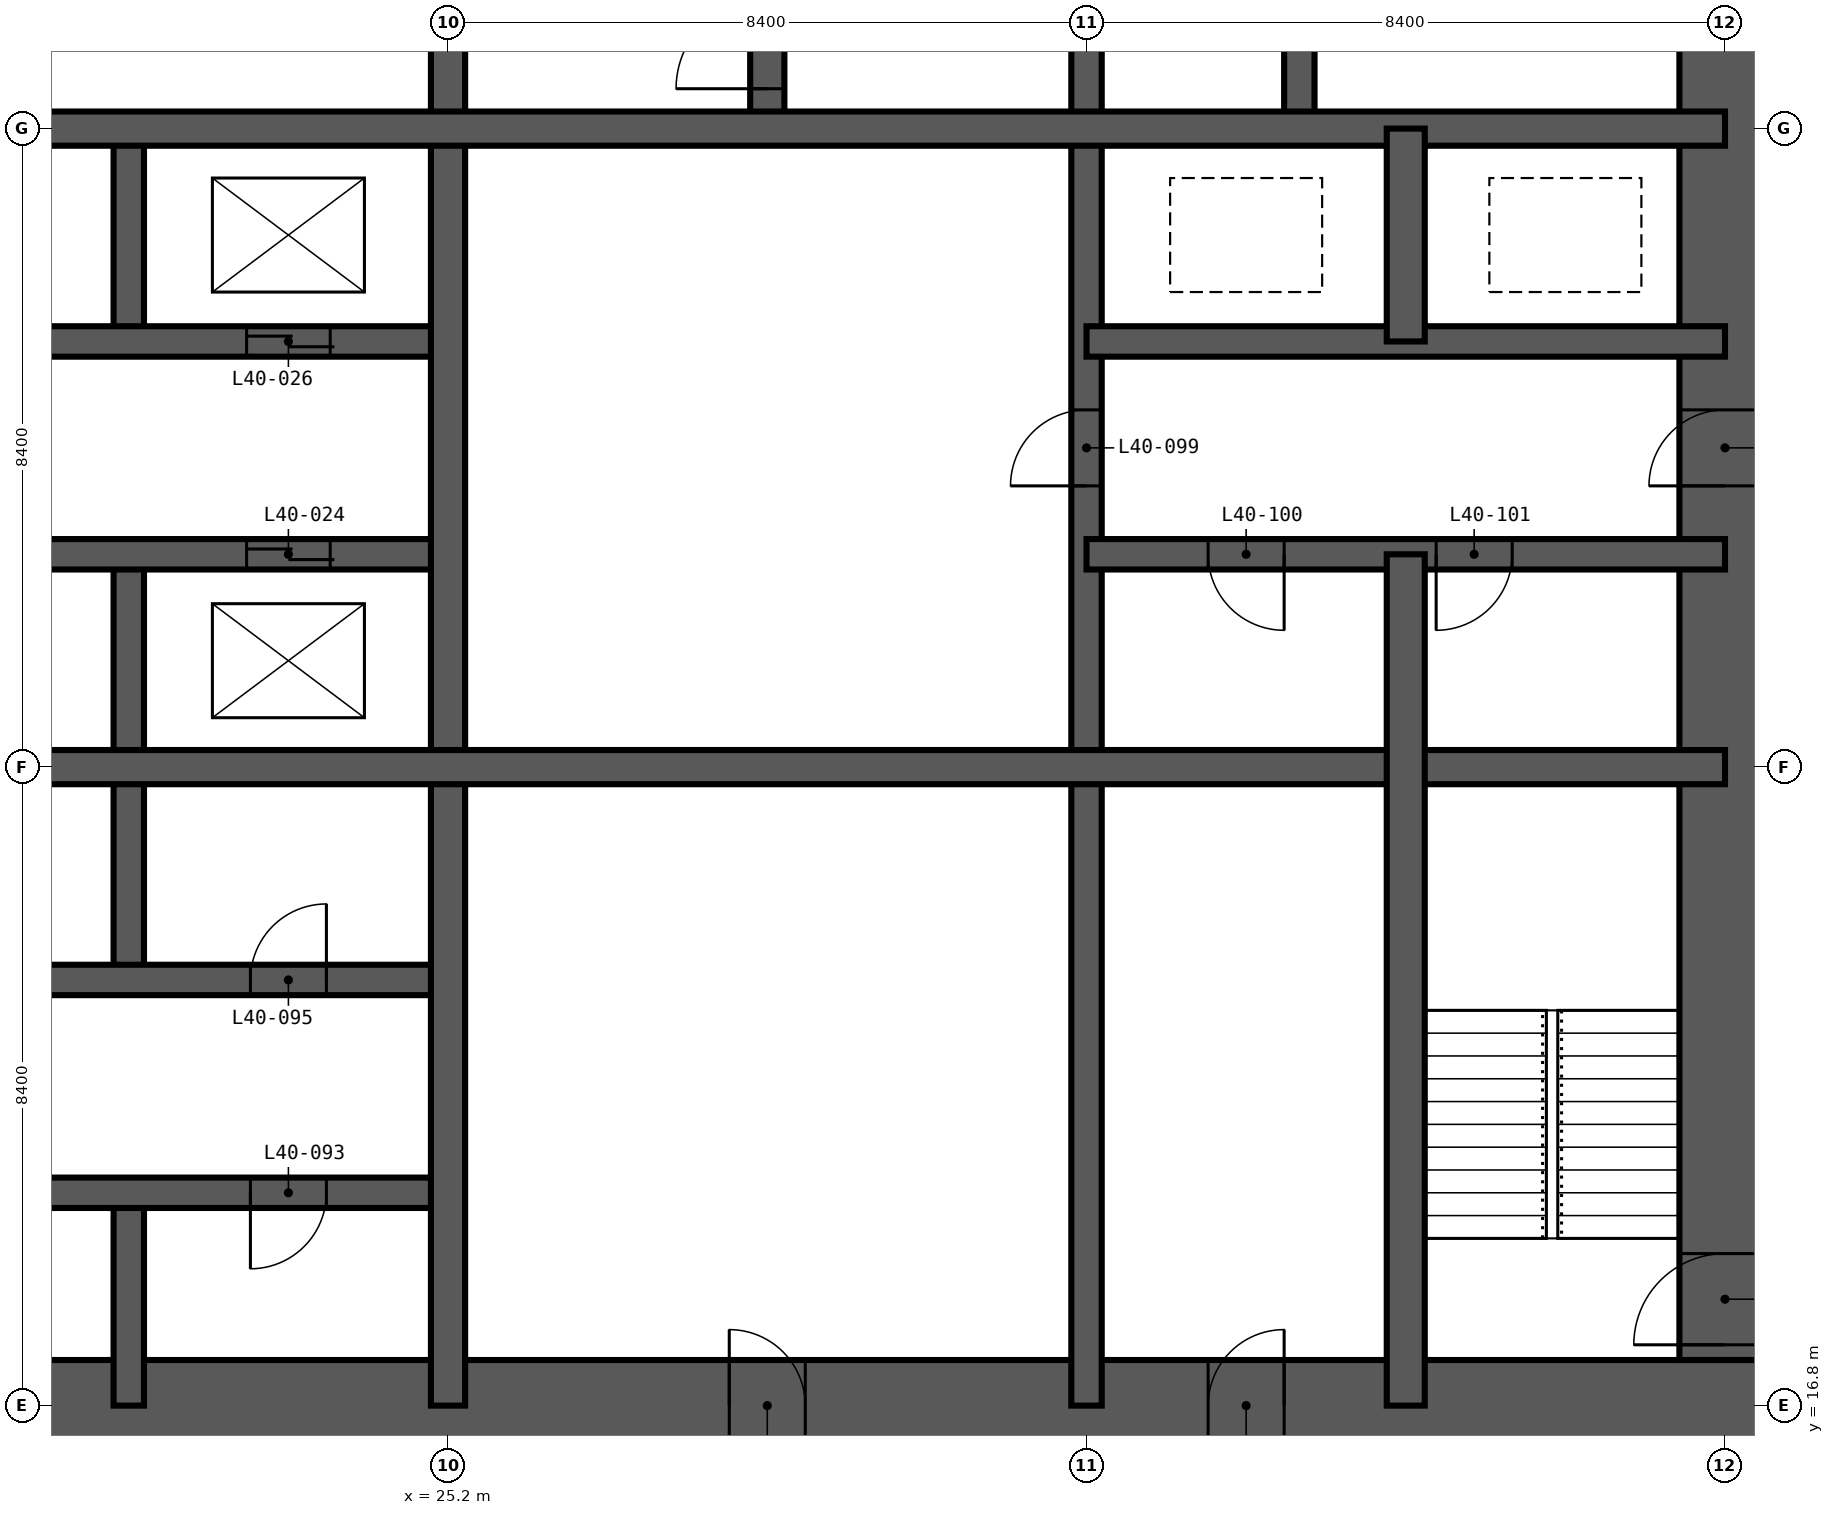
"""IFC4 building model, lengths in metres.
Left out: names, types, materials, properties, quantities, classifications, styles, units other than length and angle.
Written with IfcOpenShell. Run it as: python <this file> out.ifc"""

import sys

from ifc_helpers import new_model, si_unit, direction, frame, frame_2d, origin, place, context, subcontext, project, spatial, rectangle, extrude, element, fill, save


model = new_model("IFC4")
c1 = context("Model", 3, precision=1e-05, world=origin(), true_north=direction((0.0, 1.0)))
c2 = subcontext(c1, "Body", "Model", "MODEL_VIEW")
j1 = project(units=[si_unit("LENGTHUNIT", "METRE"), si_unit("PLANEANGLEUNIT", "RADIAN")], contexts=[c1])
p1 = place(None, origin())
s1 = spatial("IfcSite", under=j1, at=p1, CompositionType="ELEMENT")
p2 = place(p1, origin())
s2 = spatial("IfcBuilding", under=s1, at=p2, CompositionType="ELEMENT")
p3 = place(p2, frame((0.0, 0.0, 159.0)))
s3 = spatial("IfcBuildingStorey", under=s2, at=p3, CompositionType="ELEMENT", Elevation=159.0)
p4 = place(p3, frame((16.2, 16.8, -0.35), z_axis=(0.0, 0.0, 1.0), x_axis=(1.0, 0.0, 0.0)))
e1 = element("IfcWall", 1, at=p4, inside=s3, PredefinedType="SHEAR", context=c2, shape_type="SweptSolid", body=[
    extrude(rectangle(XDim=26.4, YDim=1.2, at=frame_2d((13.2, 0.0))), origin(), (0.0, 0.0, 1.0), 3.6),
])
p5 = place(p4, frame((12.7, 0.0, 0.35)))
e2 = element("IfcOpeningElement", 2, at=p5, cuts=e1, PredefinedType="OPENING", context=c2, shape_type="SweptSolid", body=[
    extrude(rectangle(XDim=1.0, YDim=2.1, at=frame_2d((0.5, 1.05))), frame((0.0, 0.61, 0.0), z_axis=(0.0, -1.0, 0.0), x_axis=(1.0, 0.0, 0.0)), (0.0, 0.0, 1.0), 1.22),
])
p6 = place(p4, frame((19.0, 0.0, 0.35)))
e3 = element("IfcOpeningElement", 3, at=p6, cuts=e1, PredefinedType="OPENING", context=c2, shape_type="SweptSolid", body=[
    extrude(rectangle(XDim=1.0, YDim=2.1, at=frame_2d((0.5, 1.05))), frame((0.0, 0.61, 0.0), z_axis=(0.0, -1.0, 0.0), x_axis=(1.0, 0.0, 0.0)), (0.0, 0.0, 1.0), 1.22),
])
p7 = place(p3, frame((42.0, 17.4, -0.35), z_axis=(0.0, 0.0, 1.0), x_axis=(0.0, 1.0, 0.0)))
e4 = element("IfcWall", 4, at=p7, inside=s3, PredefinedType="SHEAR", context=c2, shape_type="SweptSolid", body=[
    extrude(rectangle(XDim=24.0, YDim=1.2, at=frame_2d((12.0, 0.0))), origin(), (0.0, 0.0, 1.0), 3.6),
])
p8 = place(p7, frame((0.2, 0.0, 0.35)))
e5 = element("IfcOpeningElement", 5, at=p8, cuts=e4, PredefinedType="OPENING", context=c2, shape_type="SweptSolid", body=[
    extrude(rectangle(XDim=1.2, YDim=2.2, at=frame_2d((0.6, 1.1))), frame((0.0, 0.61, 0.0), z_axis=(0.0, -1.0, 0.0), x_axis=(1.0, 0.0, 0.0)), (0.0, 0.0, 1.0), 1.22),
])
p9 = place(p7, frame((11.5, 0.0, 0.35)))
e6 = element("IfcOpeningElement", 6, at=p9, cuts=e4, PredefinedType="OPENING", context=c2, shape_type="SweptSolid", body=[
    extrude(rectangle(XDim=1.0, YDim=2.1, at=frame_2d((0.5, 1.05))), frame((0.0, 0.61, 0.0), z_axis=(0.0, -1.0, 0.0), x_axis=(1.0, 0.0, 0.0)), (0.0, 0.0, 1.0), 1.22),
])
p10 = place(p7, frame((19.9, 0.0, 0.35)))
e7 = element("IfcOpeningElement", 7, at=p10, cuts=e4, PredefinedType="OPENING", context=c2, shape_type="SweptSolid", body=[
    extrude(rectangle(XDim=1.0, YDim=2.1, at=frame_2d((0.5, 1.05))), frame((0.0, 0.61, 0.0), z_axis=(0.0, -1.0, 0.0), x_axis=(1.0, 0.0, 0.0)), (0.0, 0.0, 1.0), 1.22),
])
p11 = place(p3, frame((21.0, 16.8, -0.35), z_axis=(0.0, 0.0, 1.0), x_axis=(0.0, 1.0, 0.0)))
e8 = element("IfcWall", 8, at=p11, inside=s3, PredefinedType="SHEAR", context=c2, shape_type="SweptSolid", body=[
    extrude(rectangle(XDim=2.8, YDim=0.4, at=frame_2d((1.4, 0.0))), origin(), (0.0, 0.0, 1.0), 3.6),
])
p12 = place(p3, frame((21.0, 22.4, -0.35), z_axis=(0.0, 0.0, 1.0), x_axis=(0.0, 1.0, 0.0)))
e9 = element("IfcWall", 9, at=p12, inside=s3, PredefinedType="SHEAR", context=c2, shape_type="SweptSolid", body=[
    extrude(rectangle(XDim=5.6, YDim=0.4, at=frame_2d((2.8, 0.0))), origin(), (0.0, 0.0, 1.0), 3.6),
])
p13 = place(p3, frame((21.0, 30.8, -0.35), z_axis=(0.0, 0.0, 1.0), x_axis=(0.0, 1.0, 0.0)))
e10 = element("IfcWall", 10, at=p13, inside=s3, PredefinedType="SHEAR", context=c2, shape_type="SweptSolid", body=[
    extrude(rectangle(XDim=2.8, YDim=0.4, at=frame_2d((1.4, 0.0))), origin(), (0.0, 0.0, 1.0), 3.6),
])
p14 = place(p3, frame((33.6, 16.8, -0.35), z_axis=(0.0, 0.0, 1.0), x_axis=(0.0, 1.0, 0.0)))
e11 = element("IfcWall", 11, at=p14, inside=s3, PredefinedType="SHEAR", context=c2, shape_type="SweptSolid", body=[
    extrude(rectangle(XDim=25.2, YDim=0.4, at=frame_2d((12.6, 0.0))), origin(), (0.0, 0.0, 1.0), 3.6),
])
p15 = place(p14, frame((22.5, 0.0, 0.35)))
e12 = element("IfcOpeningElement", 12, at=p15, cuts=e11, PredefinedType="OPENING", context=c2, shape_type="SweptSolid", body=[
    extrude(rectangle(XDim=1.2, YDim=2.2, at=frame_2d((0.6, 1.1))), frame((0.0, 0.21, 0.0), z_axis=(0.0, -1.0, 0.0), x_axis=(1.0, 0.0, 0.0)), (0.0, 0.0, 1.0), 0.42),
])
p16 = place(p14, frame((18.3, 0.0, 0.35)))
e13 = element("IfcOpeningElement", 13, at=p16, cuts=e11, PredefinedType="OPENING", context=c2, shape_type="SweptSolid", body=[
    extrude(rectangle(XDim=1.2, YDim=2.2, at=frame_2d((0.6, 1.1))), frame((0.0, 0.21, 0.0), z_axis=(0.0, -1.0, 0.0), x_axis=(1.0, 0.0, 0.0)), (0.0, 0.0, 1.0), 0.42),
])
p17 = place(p14, frame((12.1, 0.0, 0.35)))
e14 = element("IfcOpeningElement", 14, at=p17, cuts=e11, PredefinedType="OPENING", context=c2, shape_type="SweptSolid", body=[
    extrude(rectangle(XDim=1.0, YDim=2.1, at=frame_2d((0.5, 1.05))), frame((0.0, 0.21, 0.0), z_axis=(0.0, -1.0, 0.0), x_axis=(1.0, 0.0, 0.0)), (0.0, 0.0, 1.0), 0.42),
])
p18 = place(p3, frame((36.4, 33.6, -0.35), z_axis=(0.0, 0.0, 1.0), x_axis=(0.0, 1.0, 0.0)))
e15 = element("IfcWall", 15, at=p18, inside=s3, PredefinedType="SHEAR", context=c2, shape_type="SweptSolid", body=[
    extrude(rectangle(XDim=8.4, YDim=0.4, at=frame_2d((4.2, 0.0))), origin(), (0.0, 0.0, 1.0), 3.6),
])
p19 = place(p3, frame((16.8, 19.6, -0.35), z_axis=(0.0, 0.0, 1.0), x_axis=(1.0, 0.0, 0.0)))
e16 = element("IfcWall", 16, at=p19, inside=s3, PredefinedType="SHEAR", context=c2, shape_type="SweptSolid", body=[
    extrude(rectangle(XDim=8.4, YDim=0.4, at=frame_2d((4.2, 0.0))), origin(), (0.0, 0.0, 1.0), 3.6),
])
p20 = place(p19, frame((1.6, 0.0, 0.35)))
e17 = element("IfcOpeningElement", 17, at=p20, cuts=e16, PredefinedType="OPENING", context=c2, shape_type="SweptSolid", body=[
    extrude(rectangle(XDim=1.0, YDim=2.1, at=frame_2d((0.5, 1.05))), frame((0.0, 0.21, 0.0), z_axis=(0.0, -1.0, 0.0), x_axis=(1.0, 0.0, 0.0)), (0.0, 0.0, 1.0), 0.42),
])
p21 = place(p19, frame((5.8, 0.0, 0.35)))
e18 = element("IfcOpeningElement", 18, at=p21, cuts=e16, PredefinedType="OPENING", context=c2, shape_type="SweptSolid", body=[
    extrude(rectangle(XDim=1.0, YDim=2.1, at=frame_2d((0.5, 1.05))), frame((0.0, 0.21, 0.0), z_axis=(0.0, -1.0, 0.0), x_axis=(1.0, 0.0, 0.0)), (0.0, 0.0, 1.0), 0.42),
])
p22 = place(p3, frame((16.8, 22.4, -0.35), z_axis=(0.0, 0.0, 1.0), x_axis=(1.0, 0.0, 0.0)))
e19 = element("IfcWall", 19, at=p22, inside=s3, PredefinedType="SHEAR", context=c2, shape_type="SweptSolid", body=[
    extrude(rectangle(XDim=8.4, YDim=0.4, at=frame_2d((4.2, 0.0))), origin(), (0.0, 0.0, 1.0), 3.6),
])
p23 = place(p22, frame((1.6, 0.0, 0.35)))
e20 = element("IfcOpeningElement", 20, at=p23, cuts=e19, PredefinedType="OPENING", context=c2, shape_type="SweptSolid", body=[
    extrude(rectangle(XDim=1.0, YDim=2.1, at=frame_2d((0.5, 1.05))), frame((0.0, 0.21, 0.0), z_axis=(0.0, -1.0, 0.0), x_axis=(1.0, 0.0, 0.0)), (0.0, 0.0, 1.0), 0.42),
])
p24 = place(p22, frame((5.8, 0.0, 0.35)))
e21 = element("IfcOpeningElement", 21, at=p24, cuts=e19, PredefinedType="OPENING", context=c2, shape_type="SweptSolid", body=[
    extrude(rectangle(XDim=1.0, YDim=2.1, at=frame_2d((0.5, 1.05))), frame((0.0, 0.21, 0.0), z_axis=(0.0, -1.0, 0.0), x_axis=(1.0, 0.0, 0.0)), (0.0, 0.0, 1.0), 0.42),
])
p25 = place(p3, frame((16.8, 28.0, -0.35), z_axis=(0.0, 0.0, 1.0), x_axis=(1.0, 0.0, 0.0)))
e22 = element("IfcWall", 22, at=p25, inside=s3, PredefinedType="SHEAR", context=c2, shape_type="SweptSolid", body=[
    extrude(rectangle(XDim=8.4, YDim=0.4, at=frame_2d((4.2, 0.0))), origin(), (0.0, 0.0, 1.0), 3.6),
])
p26 = place(p25, frame((1.55, 0.0, 0.35)))
e23 = element("IfcOpeningElement", 23, at=p26, cuts=e22, PredefinedType="OPENING", context=c2, shape_type="SweptSolid", body=[
    extrude(rectangle(XDim=1.1, YDim=2.2, at=frame_2d((0.55, 1.1))), frame((0.0, 0.21, 0.0), z_axis=(0.0, -1.0, 0.0), x_axis=(1.0, 0.0, 0.0)), (0.0, 0.0, 1.0), 0.42),
])
p27 = place(p25, frame((5.75, 0.0, 0.35)))
e24 = element("IfcOpeningElement", 24, at=p27, cuts=e22, PredefinedType="OPENING", context=c2, shape_type="SweptSolid", body=[
    extrude(rectangle(XDim=1.1, YDim=2.2, at=frame_2d((0.55, 1.1))), frame((0.0, 0.21, 0.0), z_axis=(0.0, -1.0, 0.0), x_axis=(1.0, 0.0, 0.0)), (0.0, 0.0, 1.0), 0.42),
])
p28 = place(p3, frame((33.6, 28.0, -0.35), z_axis=(0.0, 0.0, 1.0), x_axis=(1.0, 0.0, 0.0)))
e25 = element("IfcWall", 25, at=p28, inside=s3, PredefinedType="SHEAR", context=c2, shape_type="SweptSolid", body=[
    extrude(rectangle(XDim=8.4, YDim=0.4, at=frame_2d((4.2, 0.0))), origin(), (0.0, 0.0, 1.0), 3.6),
])
p29 = place(p28, frame((1.6, 0.0, 0.35)))
e26 = element("IfcOpeningElement", 26, at=p29, cuts=e25, PredefinedType="OPENING", context=c2, shape_type="SweptSolid", body=[
    extrude(rectangle(XDim=1.0, YDim=2.1, at=frame_2d((0.5, 1.05))), frame((0.0, 0.21, 0.0), z_axis=(0.0, -1.0, 0.0), x_axis=(1.0, 0.0, 0.0)), (0.0, 0.0, 1.0), 0.42),
])
p30 = place(p28, frame((4.6, 0.0, 0.35)))
e27 = element("IfcOpeningElement", 27, at=p30, cuts=e25, PredefinedType="OPENING", context=c2, shape_type="SweptSolid", body=[
    extrude(rectangle(XDim=1.0, YDim=2.1, at=frame_2d((0.5, 1.05))), frame((0.0, 0.21, 0.0), z_axis=(0.0, -1.0, 0.0), x_axis=(1.0, 0.0, 0.0)), (0.0, 0.0, 1.0), 0.42),
])
p31 = place(p3, frame((16.8, 30.8, -0.35), z_axis=(0.0, 0.0, 1.0), x_axis=(1.0, 0.0, 0.0)))
e28 = element("IfcWall", 28, at=p31, inside=s3, PredefinedType="SHEAR", context=c2, shape_type="SweptSolid", body=[
    extrude(rectangle(XDim=8.4, YDim=0.4, at=frame_2d((4.2, 0.0))), origin(), (0.0, 0.0, 1.0), 3.6),
])
p32 = place(p31, frame((1.55, 0.0, 0.35)))
e29 = element("IfcOpeningElement", 29, at=p32, cuts=e28, PredefinedType="OPENING", context=c2, shape_type="SweptSolid", body=[
    extrude(rectangle(XDim=1.1, YDim=2.2, at=frame_2d((0.55, 1.1))), frame((0.0, 0.21, 0.0), z_axis=(0.0, -1.0, 0.0), x_axis=(1.0, 0.0, 0.0)), (0.0, 0.0, 1.0), 0.42),
])
p33 = place(p31, frame((5.75, 0.0, 0.35)))
e30 = element("IfcOpeningElement", 30, at=p33, cuts=e28, PredefinedType="OPENING", context=c2, shape_type="SweptSolid", body=[
    extrude(rectangle(XDim=1.1, YDim=2.2, at=frame_2d((0.55, 1.1))), frame((0.0, 0.21, 0.0), z_axis=(0.0, -1.0, 0.0), x_axis=(1.0, 0.0, 0.0)), (0.0, 0.0, 1.0), 0.42),
])
p34 = place(p3, frame((33.6, 30.8, -0.35), z_axis=(0.0, 0.0, 1.0), x_axis=(1.0, 0.0, 0.0)))
e31 = element("IfcWall", 31, at=p34, inside=s3, PredefinedType="SHEAR", context=c2, shape_type="SweptSolid", body=[
    extrude(rectangle(XDim=8.4, YDim=0.4, at=frame_2d((4.2, 0.0))), origin(), (0.0, 0.0, 1.0), 3.6),
])
p35 = place(p3, frame((25.2, 16.8, -0.35), z_axis=(0.0, 0.0, 1.0), x_axis=(0.0, 1.0, 0.0)))
e32 = element("IfcWall", 32, at=p35, inside=s3, PredefinedType="SHEAR", context=c2, shape_type="SweptSolid", body=[
    extrude(rectangle(XDim=25.2, YDim=0.45, at=frame_2d((12.6, 0.0))), origin(), (0.0, 0.0, 1.0), 3.6),
])
p36 = place(p3, frame((29.4, 33.6, -0.35), z_axis=(0.0, 0.0, 1.0), x_axis=(0.0, 1.0, 0.0)))
e33 = element("IfcWall", 33, at=p36, inside=s3, PredefinedType="SHEAR", context=c2, shape_type="SweptSolid", body=[
    extrude(rectangle(XDim=8.4, YDim=0.45, at=frame_2d((4.2, 0.0))), origin(), (0.0, 0.0, 1.0), 3.6),
])
p37 = place(p36, frame((0.525, 0.0, 0.35)))
e34 = element("IfcOpeningElement", 34, at=p37, cuts=e33, PredefinedType="OPENING", context=c2, shape_type="SweptSolid", body=[
    extrude(rectangle(XDim=1.2, YDim=2.2, at=frame_2d((0.6, 1.1))), frame((0.0, 0.235, 0.0), z_axis=(0.0, -1.0, 0.0), x_axis=(1.0, 0.0, 0.0)), (0.0, 0.0, 1.0), 0.47),
])
for number, where, z_axis, x_axis in (
    (35, (16.8, 25.2, -0.35), (0.0, 0.0, 1.0), (1.0, 0.0, 0.0)),
    (36, (16.8, 33.6, -0.35), (0.0, 0.0, 1.0), (1.0, 0.0, 0.0)),
):
    element("IfcWall", number, at=place(p3, frame(where, z_axis=z_axis, x_axis=x_axis)), inside=s3, PredefinedType="SHEAR", context=c2, shape_type="SweptSolid", body=[
        extrude(rectangle(XDim=25.2, YDim=0.45, at=frame_2d((12.6, 0.0))), origin(), (0.0, 0.0, 1.0), 3.6),
    ])
p38 = place(p3, frame((37.8, 16.8, -0.35), z_axis=(0.0, 0.0, 1.0), x_axis=(0.0, 1.0, 0.0)))
e37 = element("IfcWall", 37, at=p38, inside=s3, PredefinedType="SHEAR", context=c2, shape_type="SweptSolid", body=[
    extrude(rectangle(XDim=11.2, YDim=0.5, at=frame_2d((5.6, 0.0))), origin(), (0.0, 0.0, 1.0), 3.6),
])
p39 = place(p3, frame((37.8, 30.8, -0.35), z_axis=(0.0, 0.0, 1.0), x_axis=(0.0, 1.0, 0.0)))
e38 = element("IfcWall", 38, at=p39, inside=s3, PredefinedType="SHEAR", context=c2, shape_type="SweptSolid", body=[
    extrude(rectangle(XDim=2.8, YDim=0.5, at=frame_2d((1.4, 0.0))), origin(), (0.0, 0.0, 1.0), 3.6),
])
p40 = place(p37, origin())
e39 = element("IfcDoor", 39, at=p40, inside=s3, OperationType="SINGLE_SWING_LEFT", PredefinedType="DOOR", context=c2, shape_type="SweptSolid", body=[
    extrude(rectangle(XDim=1.2, YDim=2.2, at=frame_2d((0.6, 1.1))), frame((0.0, 0.025, 0.0), z_axis=(0.0, -1.0, 0.0), x_axis=(1.0, 0.0, 0.0)), (0.0, 0.0, 1.0), 0.05),
])
fill(e34, e39)
p41 = place(p8, origin())
e40 = element("IfcDoor", 40, at=p41, inside=s3, OperationType="SINGLE_SWING_LEFT", PredefinedType="DOOR", context=c2, shape_type="SweptSolid", body=[
    extrude(rectangle(XDim=1.2, YDim=2.2, at=frame_2d((0.6, 1.1))), frame((0.0, 0.025, 0.0), z_axis=(0.0, -1.0, 0.0), x_axis=(1.0, 0.0, 0.0)), (0.0, 0.0, 1.0), 0.05),
])
fill(e5, e40)
p42 = place(p27, origin())
e41 = element("IfcDoor", 41, at=p42, inside=s3, OperationType="DOUBLE_DOOR_SLIDING", PredefinedType="DOOR", context=c2, shape_type="SweptSolid", body=[
    extrude(rectangle(XDim=1.1, YDim=2.2, at=frame_2d((0.55, 1.1))), frame((0.0, 0.025, 0.0), z_axis=(0.0, -1.0, 0.0), x_axis=(1.0, 0.0, 0.0)), (0.0, 0.0, 1.0), 0.05),
])
fill(e24, e41)
p43 = place(p33, origin())
e42 = element("IfcDoor", 42, at=p43, inside=s3, OperationType="DOUBLE_DOOR_SLIDING", PredefinedType="DOOR", context=c2, shape_type="SweptSolid", body=[
    extrude(rectangle(XDim=1.1, YDim=2.2, at=frame_2d((0.55, 1.1))), frame((0.0, 0.025, 0.0), z_axis=(0.0, -1.0, 0.0), x_axis=(1.0, 0.0, 0.0)), (0.0, 0.0, 1.0), 0.05),
])
fill(e30, e42)
p44 = place(p21, frame((1.0, 0.0, 0.0), z_axis=(0.0, 0.0, 1.0), x_axis=(-1.0, 0.0, 0.0)))
e43 = element("IfcDoor", 43, at=p44, inside=s3, OperationType="SINGLE_SWING_RIGHT", PredefinedType="DOOR", context=c2, shape_type="SweptSolid", body=[
    extrude(rectangle(XDim=1.0, YDim=2.1, at=frame_2d((0.5, 1.05))), frame((0.0, 0.025, 0.0), z_axis=(0.0, -1.0, 0.0), x_axis=(1.0, 0.0, 0.0)), (0.0, 0.0, 1.0), 0.05),
])
fill(e18, e43)
p45 = place(p24, origin())
e44 = element("IfcDoor", 44, at=p45, inside=s3, OperationType="SINGLE_SWING_RIGHT", PredefinedType="DOOR", context=c2, shape_type="SweptSolid", body=[
    extrude(rectangle(XDim=1.0, YDim=2.1, at=frame_2d((0.5, 1.05))), frame((0.0, 0.025, 0.0), z_axis=(0.0, -1.0, 0.0), x_axis=(1.0, 0.0, 0.0)), (0.0, 0.0, 1.0), 0.05),
])
fill(e21, e44)
p46 = place(p17, origin())
e45 = element("IfcDoor", 45, at=p46, inside=s3, OperationType="SINGLE_SWING_LEFT", PredefinedType="DOOR", context=c2, shape_type="SweptSolid", body=[
    extrude(rectangle(XDim=1.0, YDim=2.1, at=frame_2d((0.5, 1.05))), frame((0.0, 0.025, 0.0), z_axis=(0.0, -1.0, 0.0), x_axis=(1.0, 0.0, 0.0)), (0.0, 0.0, 1.0), 0.05),
])
fill(e14, e45)
p47 = place(p29, frame((1.0, 0.0, 0.0), z_axis=(0.0, 0.0, 1.0), x_axis=(-1.0, 0.0, 0.0)))
e46 = element("IfcDoor", 46, at=p47, inside=s3, OperationType="SINGLE_SWING_LEFT", PredefinedType="DOOR", context=c2, shape_type="SweptSolid", body=[
    extrude(rectangle(XDim=1.0, YDim=2.1, at=frame_2d((0.5, 1.05))), frame((0.0, 0.025, 0.0), z_axis=(0.0, -1.0, 0.0), x_axis=(1.0, 0.0, 0.0)), (0.0, 0.0, 1.0), 0.05),
])
fill(e26, e46)
p48 = place(p30, frame((1.0, 0.0, 0.0), z_axis=(0.0, 0.0, 1.0), x_axis=(-1.0, 0.0, 0.0)))
e47 = element("IfcDoor", 47, at=p48, inside=s3, OperationType="SINGLE_SWING_RIGHT", PredefinedType="DOOR", context=c2, shape_type="SweptSolid", body=[
    extrude(rectangle(XDim=1.0, YDim=2.1, at=frame_2d((0.5, 1.05))), frame((0.0, 0.025, 0.0), z_axis=(0.0, -1.0, 0.0), x_axis=(1.0, 0.0, 0.0)), (0.0, 0.0, 1.0), 0.05),
])
fill(e27, e47)
p49 = place(p9, origin())
e48 = element("IfcDoor", 48, at=p49, inside=s3, OperationType="SINGLE_SWING_LEFT", PredefinedType="DOOR", context=c2, shape_type="SweptSolid", body=[
    extrude(rectangle(XDim=1.0, YDim=2.1, at=frame_2d((0.5, 1.05))), frame((0.0, 0.025, 0.0), z_axis=(0.0, -1.0, 0.0), x_axis=(1.0, 0.0, 0.0)), (0.0, 0.0, 1.0), 0.05),
])
fill(e6, e48)
p50 = place(p5, origin())
e49 = element("IfcDoor", 49, at=p50, inside=s3, OperationType="SINGLE_SWING_LEFT", PredefinedType="DOOR", context=c2, shape_type="SweptSolid", body=[
    extrude(rectangle(XDim=1.0, YDim=2.1, at=frame_2d((0.5, 1.05))), frame((0.0, 0.025, 0.0), z_axis=(0.0, -1.0, 0.0), x_axis=(1.0, 0.0, 0.0)), (0.0, 0.0, 1.0), 0.05),
])
fill(e2, e49)
p51 = place(p6, origin())
e50 = element("IfcDoor", 50, at=p51, inside=s3, OperationType="SINGLE_SWING_RIGHT", PredefinedType="DOOR", context=c2, shape_type="SweptSolid", body=[
    extrude(rectangle(XDim=1.0, YDim=2.1, at=frame_2d((0.5, 1.05))), frame((0.0, 0.025, 0.0), z_axis=(0.0, -1.0, 0.0), x_axis=(1.0, 0.0, 0.0)), (0.0, 0.0, 1.0), 0.05),
])
fill(e3, e50)
save(model, sys.argv[1])
